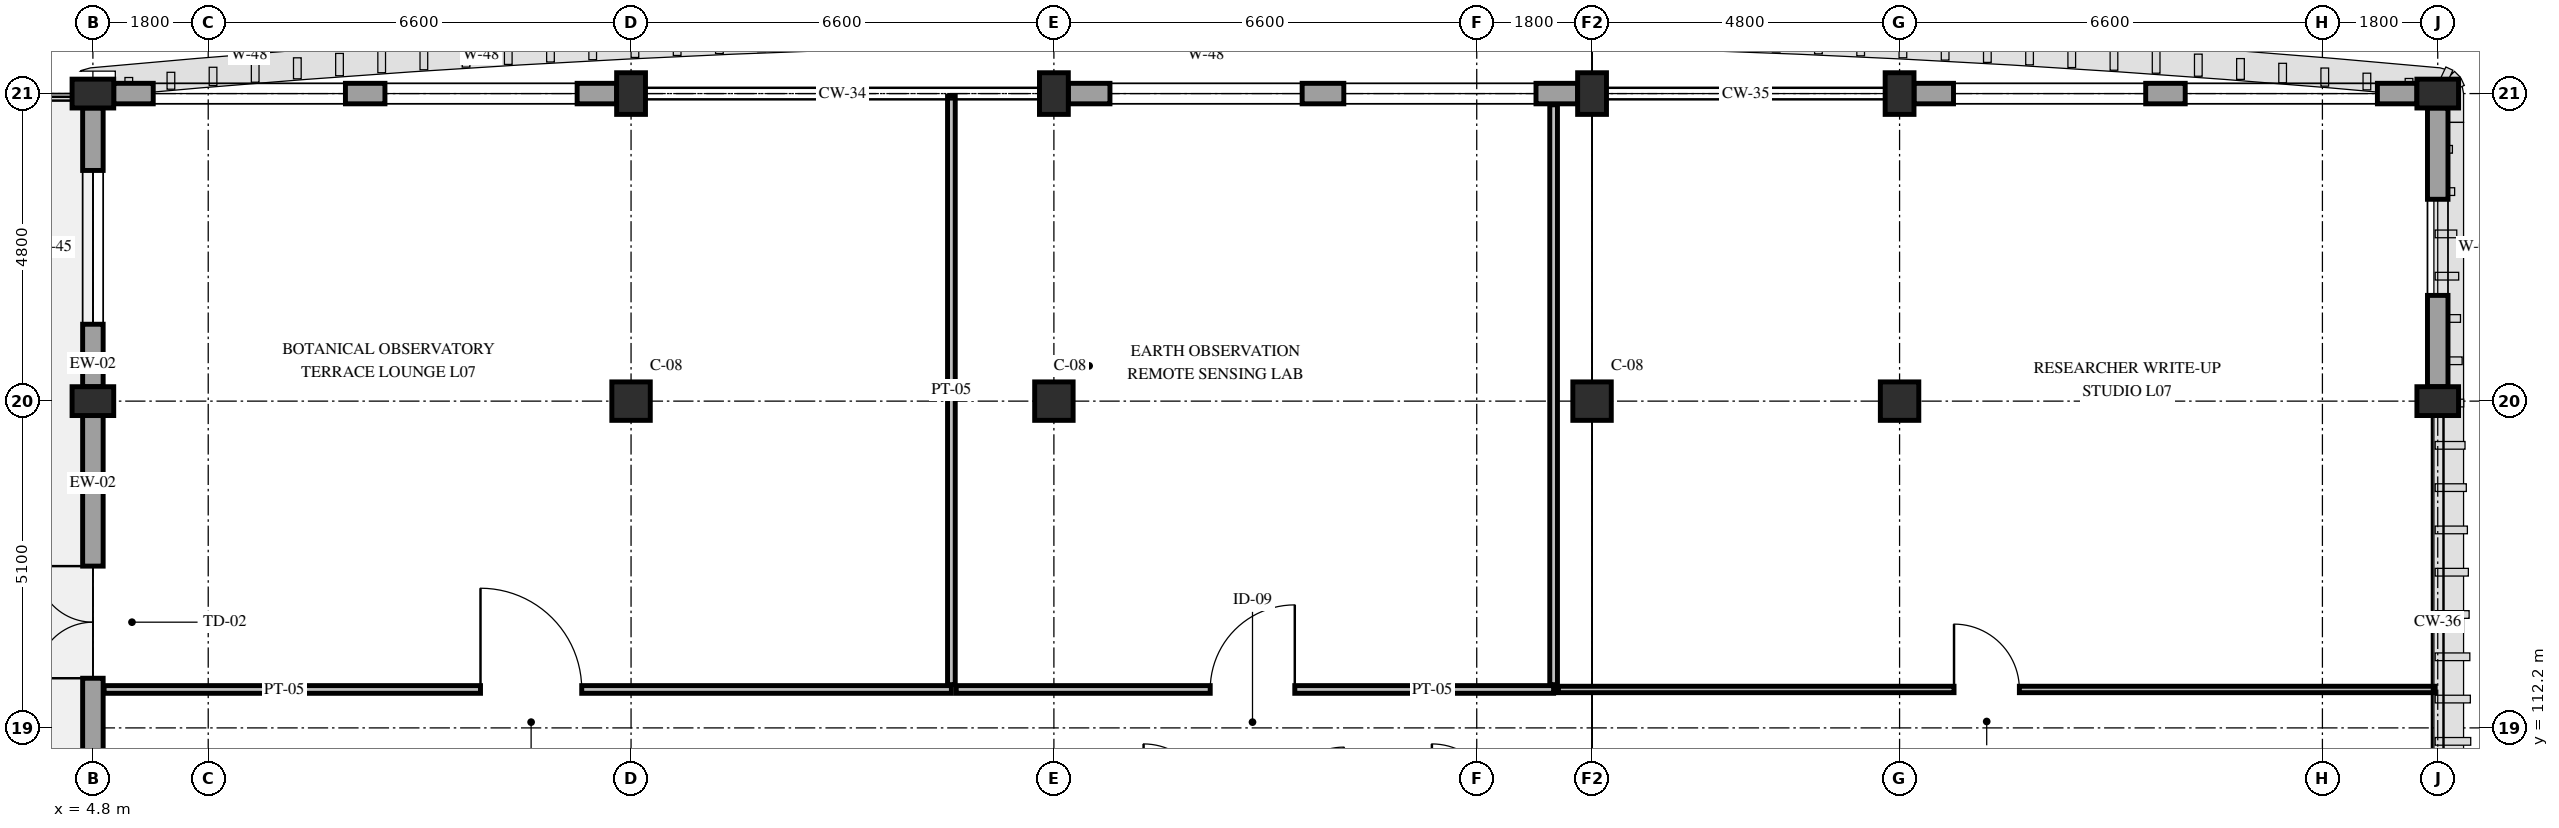
"""IFC4 building model, lengths in metres.
Left out: names, types, materials, properties, quantities, classifications, styles, units other than length and angle.
Written with IfcOpenShell. Run it as: python <this file> out.ifc"""

import sys

from ifc_helpers import new_model, si_unit, direction, frame, frame_2d, origin, origin_2d, place, context, subcontext, project, spatial, rectangle, extrude, element, fill, save


model = new_model("IFC4")
c1 = context("Model", 3, precision=1e-05, world=origin(), true_north=direction((0.0, 1.0)))
c2 = subcontext(c1, "Body", "Model", "MODEL_VIEW")
j1 = project(units=[si_unit("LENGTHUNIT", "METRE"), si_unit("PLANEANGLEUNIT", "RADIAN")], contexts=[c1])
p1 = place(None, origin())
s1 = spatial("IfcSite", under=j1, at=p1, CompositionType="ELEMENT")
p2 = place(p1, origin())
s2 = spatial("IfcBuilding", under=s1, at=p2, CompositionType="ELEMENT")
p3 = place(p2, frame((0.0, 0.0, 34.2)))
s3 = spatial("IfcBuildingStorey", under=s2, at=p3, CompositionType="ELEMENT", Elevation=34.2)
for number, where, z_axis, x_axis in (
    (1, (4.8, 117.3, 0.0), (0.0, 0.0, 1.0), (0.0, 1.0, 0.0)),
    (2, (4.8, 122.1, 0.0), (0.0, 0.0, 1.0), (0.0, 1.0, 0.0)),
):
    element("IfcColumn", number, at=place(p3, frame(where, z_axis=z_axis, x_axis=x_axis)), inside=s3, PredefinedType="PILASTER", context=c2, shape_type="SweptSolid", body=[
        extrude(rectangle(XDim=0.45, YDim=0.65, at=origin_2d()), origin(), (0.0, 0.0, 1.0), 4.2),
    ])
p4 = place(p3, frame((13.2, 117.3, 0.0), z_axis=(0.0, 0.0, 1.0), x_axis=(1.0, 0.0, 0.0)))
e3 = element("IfcColumn", 3, at=p4, inside=s3, PredefinedType="COLUMN", context=c2, shape_type="SweptSolid", body=[
    extrude(rectangle(XDim=0.6, YDim=0.6, at=origin_2d()), origin(), (0.0, 0.0, 1.0), 4.2),
])
p5 = place(p3, frame((13.2, 122.1, 0.0), z_axis=(0.0, 0.0, 1.0), x_axis=(1.0, 0.0, 0.0)))
e4 = element("IfcColumn", 4, at=p5, inside=s3, PredefinedType="PILASTER", context=c2, shape_type="SweptSolid", body=[
    extrude(rectangle(XDim=0.45, YDim=0.65, at=origin_2d()), origin(), (0.0, 0.0, 1.0), 4.2),
])
p6 = place(p3, frame((19.8, 117.3, 0.0), z_axis=(0.0, 0.0, 1.0), x_axis=(1.0, 0.0, 0.0)))
e5 = element("IfcColumn", 5, at=p6, inside=s3, PredefinedType="COLUMN", context=c2, shape_type="SweptSolid", body=[
    extrude(rectangle(XDim=0.6, YDim=0.6, at=origin_2d()), origin(), (0.0, 0.0, 1.0), 4.2),
])
p7 = place(p3, frame((19.8, 122.1, 0.0), z_axis=(0.0, 0.0, 1.0), x_axis=(1.0, 0.0, 0.0)))
e6 = element("IfcColumn", 6, at=p7, inside=s3, PredefinedType="PILASTER", context=c2, shape_type="SweptSolid", body=[
    extrude(rectangle(XDim=0.45, YDim=0.65, at=origin_2d()), origin(), (0.0, 0.0, 1.0), 4.2),
])
p8 = place(p3, frame((28.2, 117.3, 0.0), z_axis=(0.0, 0.0, 1.0), x_axis=(1.0, 0.0, 0.0)))
e7 = element("IfcColumn", 7, at=p8, inside=s3, PredefinedType="COLUMN", context=c2, shape_type="SweptSolid", body=[
    extrude(rectangle(XDim=0.6, YDim=0.6, at=origin_2d()), origin(), (0.0, 0.0, 1.0), 4.2),
])
p9 = place(p3, frame((28.2, 122.1, 0.0), z_axis=(0.0, 0.0, 1.0), x_axis=(1.0, 0.0, 0.0)))
e8 = element("IfcColumn", 8, at=p9, inside=s3, PredefinedType="PILASTER", context=c2, shape_type="SweptSolid", body=[
    extrude(rectangle(XDim=0.45, YDim=0.65, at=origin_2d()), origin(), (0.0, 0.0, 1.0), 4.2),
])
p10 = place(p3, frame((33.0, 117.3, 0.0), z_axis=(0.0, 0.0, 1.0), x_axis=(1.0, 0.0, 0.0)))
e9 = element("IfcColumn", 9, at=p10, inside=s3, PredefinedType="COLUMN", context=c2, shape_type="SweptSolid", body=[
    extrude(rectangle(XDim=0.6, YDim=0.6, at=origin_2d()), origin(), (0.0, 0.0, 1.0), 4.2),
])
for number, where, z_axis, x_axis in (
    (10, (33.0, 122.1, 0.0), (0.0, 0.0, 1.0), (1.0, 0.0, 0.0)),
    (11, (41.4, 117.3, 0.0), (0.0, 0.0, 1.0), (0.0, 1.0, 0.0)),
    (12, (41.4, 122.1, 0.0), (0.0, 0.0, 1.0), (0.0, 1.0, 0.0)),
):
    element("IfcColumn", number, at=place(p3, frame(where, z_axis=z_axis, x_axis=x_axis)), inside=s3, PredefinedType="PILASTER", context=c2, shape_type="SweptSolid", body=[
        extrude(rectangle(XDim=0.45, YDim=0.65, at=origin_2d()), origin(), (0.0, 0.0, 1.0), 4.2),
    ])
p11 = place(p3, frame((4.8, 110.625, 0.0), z_axis=(0.0, 0.0, 1.0), x_axis=(0.0, 1.0, 0.0)))
e13 = element("IfcWall", 13, at=p11, inside=s3, PredefinedType="STANDARD", context=c2, shape_type="SweptSolid", body=[
    extrude(rectangle(XDim=6.45, YDim=0.32, at=frame_2d((3.225, 0.0))), origin(), (0.0, 0.0, 1.0), 3.23),
])
p12 = place(p11, frame((2.35, 0.0, 0.0)))
e14 = element("IfcOpeningElement", 14, at=p12, cuts=e13, PredefinedType="OPENING", context=c2, shape_type="SweptSolid", body=[
    extrude(rectangle(XDim=1.75, YDim=2.3, at=frame_2d((0.875, 1.15))), frame((0.0, 0.175, 0.0), z_axis=(0.0, -1.0, 0.0), x_axis=(1.0, 0.0, 0.0)), (0.0, 0.0, 1.0), 0.35),
])
p13 = place(p3, frame((4.8, 117.525, 0.0), z_axis=(0.0, 0.0, 1.0), x_axis=(0.0, 1.0, 0.0)))
e15 = element("IfcWall", 15, at=p13, inside=s3, PredefinedType="STANDARD", context=c2, shape_type="SweptSolid", body=[
    extrude(rectangle(XDim=4.35, YDim=0.32, at=frame_2d((2.175, 0.0))), origin(), (0.0, 0.0, 1.0), 3.23),
])
p14 = place(p13, frame((0.975, 0.0, 0.65)))
e16 = element("IfcOpeningElement", 16, at=p14, cuts=e15, PredefinedType="OPENING", context=c2, shape_type="SweptSolid", body=[
    extrude(rectangle(XDim=2.4, YDim=2.24, at=frame_2d((1.2, 1.12))), frame((0.0, 0.175, 0.0), z_axis=(0.0, -1.0, 0.0), x_axis=(1.0, 0.0, 0.0)), (0.0, 0.0, 1.0), 0.35),
])
p15 = place(p3, frame((5.125, 122.1, 0.0), z_axis=(0.0, 0.0, 1.0), x_axis=(1.0, 0.0, 0.0)))
e17 = element("IfcWall", 17, at=p15, inside=s3, PredefinedType="STANDARD", context=c2, shape_type="SweptSolid", body=[
    extrude(rectangle(XDim=7.85, YDim=0.32, at=frame_2d((3.925, 0.0))), origin(), (0.0, 0.0, 1.0), 3.33),
])
p16 = place(p15, frame((0.617, 0.0, 0.85)))
e18 = element("IfcOpeningElement", 18, at=p16, cuts=e17, PredefinedType="OPENING", context=c2, shape_type="SweptSolid", body=[
    extrude(rectangle(XDim=3.0, YDim=2.08, at=frame_2d((1.5, 1.04))), frame((0.0, 0.175, 0.0), z_axis=(0.0, -1.0, 0.0), x_axis=(1.0, 0.0, 0.0)), (0.0, 0.0, 1.0), 0.35),
])
p17 = place(p15, frame((4.233, 0.0, 0.85)))
e19 = element("IfcOpeningElement", 19, at=p17, cuts=e17, PredefinedType="OPENING", context=c2, shape_type="SweptSolid", body=[
    extrude(rectangle(XDim=3.0, YDim=2.08, at=frame_2d((1.5, 1.04))), frame((0.0, 0.175, 0.0), z_axis=(0.0, -1.0, 0.0), x_axis=(1.0, 0.0, 0.0)), (0.0, 0.0, 1.0), 0.35),
])
p18 = place(p3, frame((20.025, 122.1, 0.0), z_axis=(0.0, 0.0, 1.0), x_axis=(1.0, 0.0, 0.0)))
e20 = element("IfcWall", 20, at=p18, inside=s3, PredefinedType="STANDARD", context=c2, shape_type="SweptSolid", body=[
    extrude(rectangle(XDim=7.95, YDim=0.32, at=frame_2d((3.975, 0.0))), origin(), (0.0, 0.0, 1.0), 3.33),
])
p19 = place(p18, frame((0.65, 0.0, 0.85)))
e21 = element("IfcOpeningElement", 21, at=p19, cuts=e20, PredefinedType="OPENING", context=c2, shape_type="SweptSolid", body=[
    extrude(rectangle(XDim=3.0, YDim=2.08, at=frame_2d((1.5, 1.04))), frame((0.0, 0.175, 0.0), z_axis=(0.0, -1.0, 0.0), x_axis=(1.0, 0.0, 0.0)), (0.0, 0.0, 1.0), 0.35),
])
p20 = place(p18, frame((4.3, 0.0, 0.85)))
e22 = element("IfcOpeningElement", 22, at=p20, cuts=e20, PredefinedType="OPENING", context=c2, shape_type="SweptSolid", body=[
    extrude(rectangle(XDim=3.0, YDim=2.08, at=frame_2d((1.5, 1.04))), frame((0.0, 0.175, 0.0), z_axis=(0.0, -1.0, 0.0), x_axis=(1.0, 0.0, 0.0)), (0.0, 0.0, 1.0), 0.35),
])
p21 = place(p3, frame((33.225, 122.1, 0.0), z_axis=(0.0, 0.0, 1.0), x_axis=(1.0, 0.0, 0.0)))
e23 = element("IfcWall", 23, at=p21, inside=s3, PredefinedType="STANDARD", context=c2, shape_type="SweptSolid", body=[
    extrude(rectangle(XDim=7.85, YDim=0.32, at=frame_2d((3.925, 0.0))), origin(), (0.0, 0.0, 1.0), 3.33),
])
p22 = place(p21, frame((0.617, 0.0, 0.85)))
e24 = element("IfcOpeningElement", 24, at=p22, cuts=e23, PredefinedType="OPENING", context=c2, shape_type="SweptSolid", body=[
    extrude(rectangle(XDim=3.0, YDim=2.08, at=frame_2d((1.5, 1.04))), frame((0.0, 0.175, 0.0), z_axis=(0.0, -1.0, 0.0), x_axis=(1.0, 0.0, 0.0)), (0.0, 0.0, 1.0), 0.35),
])
p23 = place(p21, frame((4.233, 0.0, 0.85)))
e25 = element("IfcOpeningElement", 25, at=p23, cuts=e23, PredefinedType="OPENING", context=c2, shape_type="SweptSolid", body=[
    extrude(rectangle(XDim=3.0, YDim=2.08, at=frame_2d((1.5, 1.04))), frame((0.0, 0.175, 0.0), z_axis=(0.0, -1.0, 0.0), x_axis=(1.0, 0.0, 0.0)), (0.0, 0.0, 1.0), 0.35),
])
p24 = place(p3, frame((41.4, 121.875, 0.0), z_axis=(0.0, 0.0, 1.0), x_axis=(0.0, -1.0, 0.0)))
e26 = element("IfcWall", 26, at=p24, inside=s3, PredefinedType="STANDARD", context=c2, shape_type="SweptSolid", body=[
    extrude(rectangle(XDim=4.35, YDim=0.32, at=frame_2d((2.175, 0.0))), origin(), (0.0, 0.0, 1.0), 3.23),
])
p25 = place(p24, frame((1.425, 0.0, 0.85)))
e27 = element("IfcOpeningElement", 27, at=p25, cuts=e26, PredefinedType="OPENING", context=c2, shape_type="SweptSolid", body=[
    extrude(rectangle(XDim=1.5, YDim=1.5, at=frame_2d((0.75, 0.75))), frame((0.0, 0.175, 0.0), z_axis=(0.0, -1.0, 0.0), x_axis=(1.0, 0.0, 0.0)), (0.0, 0.0, 1.0), 0.35),
])
p26 = place(p3, frame((4.975, 112.8, 0.0), z_axis=(0.0, 0.0, 1.0), x_axis=(1.0, 0.0, 0.0)))
e28 = element("IfcWall", 28, at=p26, inside=s3, PredefinedType="PARTITIONING", context=c2, shape_type="SweptSolid", body=[
    extrude(rectangle(XDim=13.225, YDim=0.12, at=frame_2d((6.612, 0.0))), origin(), (0.0, 0.0, 1.0), 3.48),
])
p27 = place(p26, frame((5.875, 0.0, 0.0)))
e29 = element("IfcOpeningElement", 29, at=p27, cuts=e28, PredefinedType="OPENING", context=c2, shape_type="SweptSolid", body=[
    extrude(rectangle(XDim=1.58, YDim=2.3, at=frame_2d((0.79, 1.15))), frame((0.0, 0.075, 0.0), z_axis=(0.0, -1.0, 0.0), x_axis=(1.0, 0.0, 0.0)), (0.0, 0.0, 1.0), 0.15),
])
p28 = place(p3, frame((18.2, 112.875, 0.0), z_axis=(0.0, 0.0, 1.0), x_axis=(0.0, 1.0, 0.0)))
e30 = element("IfcWall", 30, at=p28, inside=s3, PredefinedType="PARTITIONING", context=c2, shape_type="SweptSolid", body=[
    extrude(rectangle(XDim=9.185, YDim=0.12, at=frame_2d((4.593, 0.0))), origin(), (0.0, 0.0, 1.0), 3.33),
])
p29 = place(p3, frame((18.275, 112.8, 0.0), z_axis=(0.0, 0.0, 1.0), x_axis=(1.0, 0.0, 0.0)))
e31 = element("IfcWall", 31, at=p29, inside=s3, PredefinedType="PARTITIONING", context=c2, shape_type="SweptSolid", body=[
    extrude(rectangle(XDim=9.325, YDim=0.12, at=frame_2d((4.663, 0.0))), origin(), (0.0, 0.0, 1.0), 3.53),
])
p30 = place(p29, frame((3.965, 0.0, 0.0)))
e32 = element("IfcOpeningElement", 32, at=p30, cuts=e31, PredefinedType="OPENING", context=c2, shape_type="SweptSolid", body=[
    extrude(rectangle(XDim=1.32, YDim=2.2, at=frame_2d((0.66, 1.1))), frame((0.0, 0.075, 0.0), z_axis=(0.0, -1.0, 0.0), x_axis=(1.0, 0.0, 0.0)), (0.0, 0.0, 1.0), 0.15),
])
p31 = place(p3, frame((27.6, 112.875, 0.0), z_axis=(0.0, 0.0, 1.0), x_axis=(0.0, 1.0, 0.0)))
e33 = element("IfcWall", 33, at=p31, inside=s3, PredefinedType="PARTITIONING", context=c2, shape_type="SweptSolid", body=[
    extrude(rectangle(XDim=9.05, YDim=0.12, at=frame_2d((4.525, 0.0))), origin(), (0.0, 0.0, 1.0), 3.23),
])
p32 = place(p3, frame((27.675, 112.8, 0.0), z_axis=(0.0, 0.0, 1.0), x_axis=(1.0, 0.0, 0.0)))
e34 = element("IfcWall", 34, at=p32, inside=s3, PredefinedType="PARTITIONING", context=c2, shape_type="SweptSolid", body=[
    extrude(rectangle(XDim=13.685, YDim=0.1, at=frame_2d((6.843, 0.0))), origin(), (0.0, 0.0, 1.0), 3.48),
])
p33 = place(p32, frame((6.175, 0.0, 0.0)))
e35 = element("IfcOpeningElement", 35, at=p33, cuts=e34, PredefinedType="OPENING", context=c2, shape_type="SweptSolid", body=[
    extrude(rectangle(XDim=1.02, YDim=2.2, at=frame_2d((0.51, 1.1))), frame((0.0, 0.065, 0.0), z_axis=(0.0, -1.0, 0.0), x_axis=(1.0, 0.0, 0.0)), (0.0, 0.0, 1.0), 0.13),
])
p34 = place(p12, origin())
e36 = element("IfcDoor", 36, at=p34, inside=s3, OperationType="DOUBLE_DOOR_SINGLE_SWING", PredefinedType="DOOR", context=c2, shape_type="SweptSolid", body=[
    extrude(rectangle(XDim=1.75, YDim=2.3, at=frame_2d((0.875, 1.15))), frame((0.0, 0.025, 0.0), z_axis=(0.0, -1.0, 0.0), x_axis=(1.0, 0.0, 0.0)), (0.0, 0.0, 1.0), 0.05),
])
fill(e14, e36)
p35 = place(p14, origin())
e37 = element("IfcWindow", 37, at=p35, inside=s3, PartitioningType="DOUBLE_PANEL_VERTICAL", PredefinedType="WINDOW", context=c2, shape_type="SweptSolid", body=[
    extrude(rectangle(XDim=2.4, YDim=2.24, at=frame_2d((1.2, 1.12))), frame((0.0, 0.03, 0.0), z_axis=(0.0, -1.0, 0.0), x_axis=(1.0, 0.0, 0.0)), (0.0, 0.0, 1.0), 0.06),
])
fill(e16, e37)
p36 = place(p16, origin())
e38 = element("IfcWindow", 38, at=p36, inside=s3, PartitioningType="DOUBLE_PANEL_VERTICAL", PredefinedType="WINDOW", context=c2, shape_type="SweptSolid", body=[
    extrude(rectangle(XDim=3.0, YDim=2.08, at=frame_2d((1.5, 1.04))), frame((0.0, 0.03, 0.0), z_axis=(0.0, -1.0, 0.0), x_axis=(1.0, 0.0, 0.0)), (0.0, 0.0, 1.0), 0.06),
])
fill(e18, e38)
p37 = place(p17, origin())
e39 = element("IfcWindow", 39, at=p37, inside=s3, PartitioningType="DOUBLE_PANEL_VERTICAL", PredefinedType="WINDOW", context=c2, shape_type="SweptSolid", body=[
    extrude(rectangle(XDim=3.0, YDim=2.08, at=frame_2d((1.5, 1.04))), frame((0.0, 0.03, 0.0), z_axis=(0.0, -1.0, 0.0), x_axis=(1.0, 0.0, 0.0)), (0.0, 0.0, 1.0), 0.06),
])
fill(e19, e39)
p38 = place(p19, origin())
e40 = element("IfcWindow", 40, at=p38, inside=s3, PartitioningType="DOUBLE_PANEL_VERTICAL", PredefinedType="WINDOW", context=c2, shape_type="SweptSolid", body=[
    extrude(rectangle(XDim=3.0, YDim=2.08, at=frame_2d((1.5, 1.04))), frame((0.0, 0.03, 0.0), z_axis=(0.0, -1.0, 0.0), x_axis=(1.0, 0.0, 0.0)), (0.0, 0.0, 1.0), 0.06),
])
fill(e21, e40)
p39 = place(p20, origin())
e41 = element("IfcWindow", 41, at=p39, inside=s3, PartitioningType="DOUBLE_PANEL_VERTICAL", PredefinedType="WINDOW", context=c2, shape_type="SweptSolid", body=[
    extrude(rectangle(XDim=3.0, YDim=2.08, at=frame_2d((1.5, 1.04))), frame((0.0, 0.03, 0.0), z_axis=(0.0, -1.0, 0.0), x_axis=(1.0, 0.0, 0.0)), (0.0, 0.0, 1.0), 0.06),
])
fill(e22, e41)
p40 = place(p22, origin())
e42 = element("IfcWindow", 42, at=p40, inside=s3, PartitioningType="DOUBLE_PANEL_VERTICAL", PredefinedType="WINDOW", context=c2, shape_type="SweptSolid", body=[
    extrude(rectangle(XDim=3.0, YDim=2.08, at=frame_2d((1.5, 1.04))), frame((0.0, 0.03, 0.0), z_axis=(0.0, -1.0, 0.0), x_axis=(1.0, 0.0, 0.0)), (0.0, 0.0, 1.0), 0.06),
])
fill(e24, e42)
p41 = place(p23, origin())
e43 = element("IfcWindow", 43, at=p41, inside=s3, PartitioningType="DOUBLE_PANEL_VERTICAL", PredefinedType="WINDOW", context=c2, shape_type="SweptSolid", body=[
    extrude(rectangle(XDim=3.0, YDim=2.08, at=frame_2d((1.5, 1.04))), frame((0.0, 0.03, 0.0), z_axis=(0.0, -1.0, 0.0), x_axis=(1.0, 0.0, 0.0)), (0.0, 0.0, 1.0), 0.06),
])
fill(e25, e43)
p42 = place(p25, origin())
e44 = element("IfcWindow", 44, at=p42, inside=s3, PartitioningType="SINGLE_PANEL", PredefinedType="WINDOW", context=c2, shape_type="SweptSolid", body=[
    extrude(rectangle(XDim=1.5, YDim=1.5, at=frame_2d((0.75, 0.75))), frame((0.0, 0.03, 0.0), z_axis=(0.0, -1.0, 0.0), x_axis=(1.0, 0.0, 0.0)), (0.0, 0.0, 1.0), 0.06),
])
fill(e27, e44)
p43 = place(p27, origin())
e45 = element("IfcDoor", 45, at=p43, inside=s3, OperationType="SINGLE_SWING_LEFT", PredefinedType="DOOR", context=c2, shape_type="SweptSolid", body=[
    extrude(rectangle(XDim=1.58, YDim=2.3, at=frame_2d((0.79, 1.15))), frame((0.0, 0.025, 0.0), z_axis=(0.0, -1.0, 0.0), x_axis=(1.0, 0.0, 0.0)), (0.0, 0.0, 1.0), 0.05),
])
fill(e29, e45)
p44 = place(p30, origin())
e46 = element("IfcDoor", 46, at=p44, inside=s3, OperationType="SINGLE_SWING_RIGHT", PredefinedType="DOOR", context=c2, shape_type="SweptSolid", body=[
    extrude(rectangle(XDim=1.32, YDim=2.2, at=frame_2d((0.66, 1.1))), frame((0.0, 0.025, 0.0), z_axis=(0.0, -1.0, 0.0), x_axis=(1.0, 0.0, 0.0)), (0.0, 0.0, 1.0), 0.05),
])
fill(e32, e46)
p45 = place(p33, origin())
e47 = element("IfcDoor", 47, at=p45, inside=s3, OperationType="SINGLE_SWING_LEFT", PredefinedType="DOOR", context=c2, shape_type="SweptSolid", body=[
    extrude(rectangle(XDim=1.02, YDim=2.2, at=frame_2d((0.51, 1.1))), frame((0.0, 0.025, 0.0), z_axis=(0.0, -1.0, 0.0), x_axis=(1.0, 0.0, 0.0)), (0.0, 0.0, 1.0), 0.05),
])
fill(e35, e47)
save(model, sys.argv[1])
